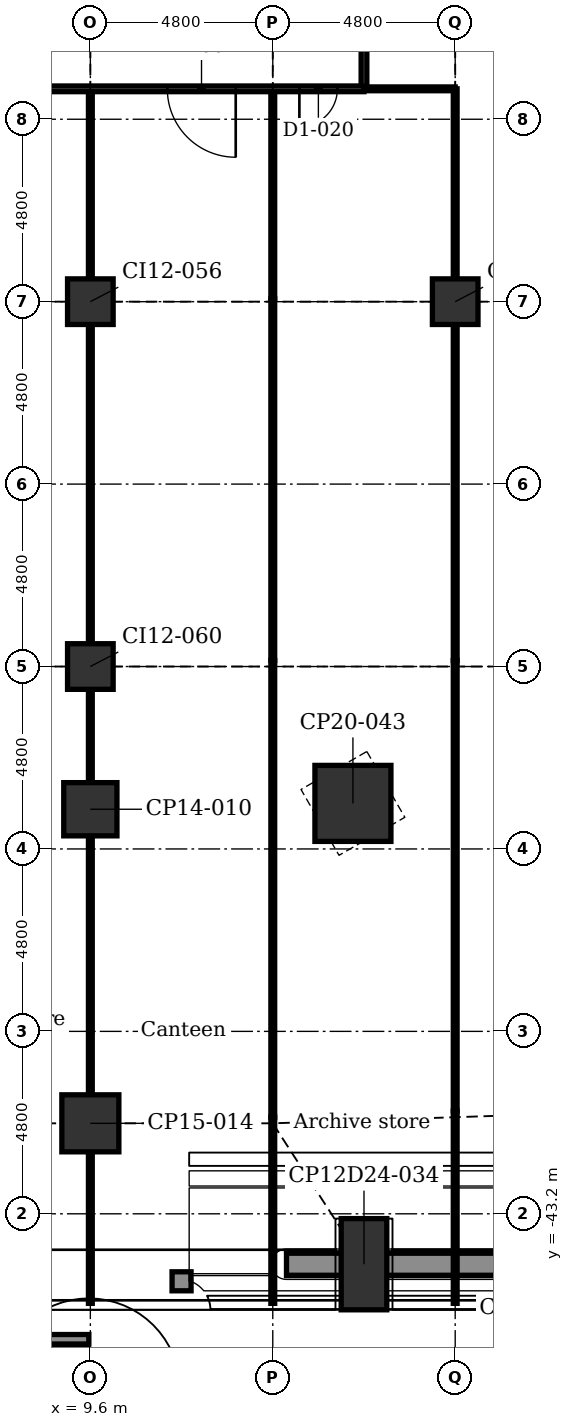
"""IFC4 building model, lengths in metres.
Left out: names, types, materials, properties, quantities, classifications, styles, units other than length and angle.
Written with IfcOpenShell. Run it as: python <this file> out.ifc"""

import sys

from ifc_helpers import new_model, si_unit, direction, frame, frame_2d, origin, origin_2d, place, context, subcontext, project, spatial, polyline, rectangle, outline, extrude, element, fill, save


model = new_model("IFC4")
c1 = context("Model", 3, precision=1e-05, world=origin(), true_north=direction((0.0, 1.0)))
c2 = subcontext(c1, "Body", "Model", "MODEL_VIEW")
j1 = project(units=[si_unit("LENGTHUNIT", "METRE"), si_unit("PLANEANGLEUNIT", "RADIAN")], contexts=[c1])
p1 = place(None, origin())
s1 = spatial("IfcSite", under=j1, at=p1, CompositionType="ELEMENT")
p2 = place(p1, origin())
s2 = spatial("IfcBuilding", under=s1, at=p2, CompositionType="ELEMENT")
p3 = place(p2, frame((0.0, 0.0, 7.0)))
s3 = spatial("IfcBuildingStorey", under=s2, at=p3, CompositionType="ELEMENT", Elevation=7.0)
p4 = place(p3, frame((16.8, -44.526, -0.3), z_axis=(0.0, 0.0, 1.0), x_axis=(1.0, 0.0, 0.0)))
e1 = element("IfcColumn", 1, at=p4, inside=s3, PredefinedType="COLUMN", context=c2, shape_type="SweptSolid", body=[
    extrude(rectangle(XDim=1.2, YDim=2.4, at=origin_2d()), origin(), (0.0, 0.0, 1.0), 5.4),
])
p5 = place(p3, frame((9.6, -40.819, -0.3), z_axis=(0.0, 0.0, 1.0), x_axis=(1.0, 0.0, 0.0)))
e2 = element("IfcColumn", 2, at=p5, inside=s3, PredefinedType="COLUMN", context=c2, shape_type="SweptSolid", body=[
    extrude(rectangle(XDim=1.5, YDim=1.5, at=origin_2d()), origin(), (0.0, 0.0, 1.0), 5.4),
])
p6 = place(p3, frame((16.509, -32.401, -0.3), z_axis=(0.0, 0.0, 1.0), x_axis=(0.866025403784, 0.5, 0.0)))
e3 = element("IfcColumn", 3, at=p6, inside=s3, PredefinedType="COLUMN", context=c2, shape_type="SweptSolid", body=[
    extrude(rectangle(XDim=2.0, YDim=2.0, at=origin_2d()), origin(), (0.0, 0.0, 1.0), 5.4),
])
p7 = place(p3, frame((9.6, -32.555, -0.3), z_axis=(0.0, 0.0, 1.0), x_axis=(1.0, 0.0, 0.0)))
e4 = element("IfcColumn", 4, at=p7, inside=s3, PredefinedType="COLUMN", context=c2, shape_type="SweptSolid", body=[
    extrude(rectangle(XDim=1.4, YDim=1.4, at=origin_2d()), origin(), (0.0, 0.0, 1.0), 5.4),
])
for number, where, z_axis, x_axis in (
    (5, (9.6, -28.8, -0.3), (0.0, 0.0, 1.0), (1.0, 0.0, 0.0)),
    (6, (9.6, -19.2, -0.3), (0.0, 0.0, 1.0), (1.0, 0.0, 0.0)),
    (7, (19.2, -19.2, -0.3), (0.0, 0.0, 1.0), (1.0, 0.0, 0.0)),
):
    element("IfcColumn", number, at=place(p3, frame(where, z_axis=z_axis, x_axis=x_axis)), inside=s3, PredefinedType="COLUMN", context=c2, shape_type="SweptSolid", body=[
        extrude(rectangle(XDim=1.2, YDim=1.2, at=origin_2d()), origin(), (0.0, 0.0, 1.0), 5.4),
    ])
p8 = place(p3, frame((20.761, -44.526, 5.4), z_axis=(0.0, 0.0, 1.0), x_axis=(-1.0, 0.0, 0.0)))
e8 = element("IfcWall", 8, at=p8, inside=s3, PredefinedType="USERDEFINED", context=c2, shape_type="SweptSolid", body=[
    extrude(rectangle(XDim=6.0, YDim=0.6, at=frame_2d((3.0, 0.0))), origin(), (0.0, 0.0, 1.0), 0.7),
])
p9 = place(p3, frame((9.56, -46.501, 0.0), z_axis=(0.0, 0.0, 1.0), x_axis=(-1.0, 0.0, 0.0)))
e9 = element("IfcWall", 9, at=p9, inside=s3, PredefinedType="SOLIDWALL", context=c2, shape_type="SweptSolid", body=[
    extrude(outline(polyline([(0.0, 0.0), (8.4, 0.0), (8.4, 5.5), (0.0, 0.274), (0.0, 0.0)])), frame((0.0, 0.125, 0.0), z_axis=(0.0, -1.0, 0.0), x_axis=(1.0, 0.0, 0.0)), (0.0, 0.0, 1.0), 0.25),
])
p10 = place(p3, frame((12.25, -44.976, 0.0), z_axis=(0.0, 0.0, 1.0), x_axis=(-1.0, 0.0, 0.0)))
e10 = element("IfcWall", 10, at=p10, inside=s3, PredefinedType="SOLIDWALL", context=c2, shape_type="SweptSolid", body=[
    extrude(rectangle(XDim=0.5, YDim=0.5, at=frame_2d((0.25, 0.0))), origin(), (0.0, 0.0, 1.0), 4.8),
])
p11 = place(p3, frame((19.2, -40.498, 0.0), z_axis=(0.0, 0.0, 1.0), x_axis=(0.0, 1.0, 0.0)))
e11 = element("IfcWall", 11, at=p11, inside=s3, PredefinedType="PARTITIONING", context=c2, shape_type="SweptSolid", body=[
    extrude(rectangle(XDim=11.858, YDim=0.1, at=frame_2d((5.929, 0.0))), origin(), (0.0, 0.0, 1.0), 4.567),
])
p12 = place(p3, frame((19.2, -45.556, 0.0), z_axis=(0.0, 0.0, 1.0), x_axis=(0.0, 1.0, 0.0)))
e12 = element("IfcWall", 12, at=p12, inside=s3, PredefinedType="PARTITIONING", context=c2, shape_type="SweptSolid", body=[
    extrude(rectangle(XDim=5.058, YDim=0.1, at=frame_2d((2.529, 0.0))), origin(), (0.0, 0.0, 1.0), 5.1),
])
p13 = place(p3, frame((19.2, -28.64, 0.0), z_axis=(0.0, 0.0, 1.0), x_axis=(0.0, 1.0, 0.0)))
e13 = element("IfcWall", 13, at=p13, inside=s3, PredefinedType="PARTITIONING", context=c2, shape_type="SweptSolid", body=[
    extrude(rectangle(XDim=8.88, YDim=0.1, at=frame_2d((4.44, 0.0))), origin(), (0.0, 0.0, 1.0), 4.693),
])
p14 = place(p3, frame((19.2, -19.76, 0.0), z_axis=(0.0, 0.0, 1.0), x_axis=(0.0, 1.0, 0.0)))
e14 = element("IfcWall", 14, at=p14, inside=s3, PredefinedType="PARTITIONING", context=c2, shape_type="SweptSolid", body=[
    extrude(rectangle(XDim=1.12, YDim=0.1, at=frame_2d((0.56, 0.0))), origin(), (0.0, 0.0, 1.0), 5.1),
])
p15 = place(p3, frame((19.2, -18.64, 0.0), z_axis=(0.0, 0.0, 1.0), x_axis=(0.0, 1.0, 0.0)))
e15 = element("IfcWall", 15, at=p15, inside=s3, PredefinedType="PARTITIONING", context=c2, shape_type="SweptSolid", body=[
    extrude(rectangle(XDim=5.04, YDim=0.1, at=frame_2d((2.52, 0.0))), origin(), (0.0, 0.0, 1.0), 4.693),
])
p16 = place(p3, frame((16.8, -13.6, 0.0), z_axis=(0.0, 0.0, 1.0), x_axis=(0.0, 1.0, 0.0)))
e16 = element("IfcWall", 16, at=p16, inside=s3, PredefinedType="PARTITIONING", context=c2, shape_type="SweptSolid", body=[
    extrude(rectangle(XDim=9.65, YDim=0.15, at=frame_2d((4.825, 0.0))), origin(), (0.0, 0.0, 1.0), 5.1),
])
p17 = place(p16, frame((1.3, 0.0, 0.0)))
e17 = element("IfcOpeningElement", 17, at=p17, cuts=e16, PredefinedType="OPENING", context=c2, shape_type="SweptSolid", body=[
    extrude(rectangle(XDim=1.0, YDim=2.1, at=frame_2d((0.5, 1.05))), frame((0.0, 0.085, 0.0), z_axis=(0.0, -1.0, 0.0), x_axis=(1.0, 0.0, 0.0)), (0.0, 0.0, 1.0), 0.17),
])
p18 = place(p16, frame((7.7, 0.0, 0.0)))
e18 = element("IfcOpeningElement", 18, at=p18, cuts=e16, PredefinedType="OPENING", context=c2, shape_type="SweptSolid", body=[
    extrude(rectangle(XDim=1.0, YDim=2.1, at=frame_2d((0.5, 1.05))), frame((0.0, 0.085, 0.0), z_axis=(0.0, -1.0, 0.0), x_axis=(1.0, 0.0, 0.0)), (0.0, 0.0, 1.0), 0.17),
])
p19 = place(p3, frame((14.4, -40.659, 0.0), z_axis=(0.0, 0.0, 1.0), x_axis=(0.0, 1.0, 0.0)))
e19 = element("IfcWall", 19, at=p19, inside=s3, PredefinedType="PARTITIONING", context=c2, shape_type="SweptSolid", body=[
    extrude(rectangle(XDim=12.019, YDim=0.1, at=frame_2d((6.01, 0.0))), origin(), (0.0, 0.0, 1.0), 4.567),
])
p20 = place(p3, frame((14.4, -45.556, 0.0), z_axis=(0.0, 0.0, 1.0), x_axis=(0.0, 1.0, 0.0)))
e20 = element("IfcWall", 20, at=p20, inside=s3, PredefinedType="PARTITIONING", context=c2, shape_type="SweptSolid", body=[
    extrude(rectangle(XDim=4.897, YDim=0.1, at=frame_2d((2.448, 0.0))), origin(), (0.0, 0.0, 1.0), 5.1),
])
p21 = place(p3, frame((14.4, -28.64, 0.0), z_axis=(0.0, 0.0, 1.0), x_axis=(0.0, 1.0, 0.0)))
e21 = element("IfcWall", 21, at=p21, inside=s3, PredefinedType="PARTITIONING", context=c2, shape_type="SweptSolid", body=[
    extrude(rectangle(XDim=9.514, YDim=0.1, at=frame_2d((4.757, 0.0))), origin(), (0.0, 0.0, 1.0), 4.643),
])
p22 = place(p3, frame((14.4, -19.126, 0.0), z_axis=(0.0, 0.0, 1.0), x_axis=(0.0, 1.0, 0.0)))
e22 = element("IfcWall", 22, at=p22, inside=s3, PredefinedType="PARTITIONING", context=c2, shape_type="SweptSolid", body=[
    extrude(rectangle(XDim=5.526, YDim=0.1, at=frame_2d((2.763, 0.0))), origin(), (0.0, 0.0, 1.0), 4.693),
])
p23 = place(p3, frame((9.6, -28.24, 0.0), z_axis=(0.0, 0.0, 1.0), x_axis=(0.0, 1.0, 0.0)))
e23 = element("IfcWall", 23, at=p23, inside=s3, PredefinedType="PARTITIONING", context=c2, shape_type="SweptSolid", body=[
    extrude(rectangle(XDim=8.48, YDim=0.1, at=frame_2d((4.24, 0.0))), origin(), (0.0, 0.0, 1.0), 4.693),
])
p24 = place(p3, frame((9.6, -45.556, 0.0), z_axis=(0.0, 0.0, 1.0), x_axis=(0.0, 1.0, 0.0)))
e24 = element("IfcWall", 24, at=p24, inside=s3, PredefinedType="PARTITIONING", context=c2, shape_type="SweptSolid", body=[
    extrude(rectangle(XDim=5.447, YDim=0.1, at=frame_2d((2.724, 0.0))), origin(), (0.0, 0.0, 1.0), 5.1),
])
p25 = place(p3, frame((9.6, -40.109, 0.0), z_axis=(0.0, 0.0, 1.0), x_axis=(0.0, 1.0, 0.0)))
e25 = element("IfcWall", 25, at=p25, inside=s3, PredefinedType="PARTITIONING", context=c2, shape_type="SweptSolid", body=[
    extrude(rectangle(XDim=6.894, YDim=0.1, at=frame_2d((3.447, 0.0))), origin(), (0.0, 0.0, 1.0), 4.79),
])
p26 = place(p3, frame((9.6, -33.215, 0.0), z_axis=(0.0, 0.0, 1.0), x_axis=(0.0, 1.0, 0.0)))
e26 = element("IfcWall", 26, at=p26, inside=s3, PredefinedType="PARTITIONING", context=c2, shape_type="SweptSolid", body=[
    extrude(rectangle(XDim=1.32, YDim=0.1, at=frame_2d((0.66, 0.0))), origin(), (0.0, 0.0, 1.0), 5.1),
])
p27 = place(p3, frame((9.6, -31.896, 0.0), z_axis=(0.0, 0.0, 1.0), x_axis=(0.0, 1.0, 0.0)))
e27 = element("IfcWall", 27, at=p27, inside=s3, PredefinedType="PARTITIONING", context=c2, shape_type="SweptSolid", body=[
    extrude(rectangle(XDim=2.535, YDim=0.1, at=frame_2d((1.268, 0.0))), origin(), (0.0, 0.0, 1.0), 4.79),
])
for number, where, z_axis, x_axis in (
    (28, (9.6, -29.36, 0.0), (0.0, 0.0, 1.0), (0.0, 1.0, 0.0)),
    (29, (9.6, -19.76, 0.0), (0.0, 0.0, 1.0), (0.0, 1.0, 0.0)),
):
    element("IfcWall", number, at=place(p3, frame(where, z_axis=z_axis, x_axis=x_axis)), inside=s3, PredefinedType="PARTITIONING", context=c2, shape_type="SweptSolid", body=[
        extrude(rectangle(XDim=1.12, YDim=0.1, at=frame_2d((0.56, 0.0))), origin(), (0.0, 0.0, 1.0), 5.1),
    ])
p28 = place(p3, frame((9.6, -18.64, 0.0), z_axis=(0.0, 0.0, 1.0), x_axis=(0.0, 1.0, 0.0)))
e30 = element("IfcWall", 30, at=p28, inside=s3, PredefinedType="PARTITIONING", context=c2, shape_type="SweptSolid", body=[
    extrude(rectangle(XDim=5.04, YDim=0.1, at=frame_2d((2.52, 0.0))), origin(), (0.0, 0.0, 1.0), 4.693),
])
p29 = place(p3, frame((16.8, -13.6, 0.0), z_axis=(0.0, 0.0, 1.0), x_axis=(1.0, 0.0, 0.0)))
e31 = element("IfcWall", 31, at=p29, inside=s3, PredefinedType="PARTITIONING", context=c2, shape_type="SweptSolid", body=[
    extrude(rectangle(XDim=2.4, YDim=0.1, at=frame_2d((1.2, 0.0))), origin(), (0.0, 0.0, 1.0), 5.1),
])
p30 = place(p3, frame((-16.8, -13.6, 0.0), z_axis=(0.0, 0.0, 1.0), x_axis=(1.0, 0.0, 0.0)))
e32 = element("IfcWall", 32, at=p30, inside=s3, PredefinedType="PARTITIONING", context=c2, shape_type="SweptSolid", body=[
    extrude(rectangle(XDim=33.6, YDim=0.15, at=frame_2d((16.8, 0.0))), origin(), (0.0, 0.0, 1.0), 5.1),
])
p31 = place(p30, frame((0.7, 0.0, 0.0)))
e33 = element("IfcOpeningElement", 33, at=p31, cuts=e32, PredefinedType="OPENING", context=c2, shape_type="SweptSolid", body=[
    extrude(rectangle(XDim=1.0, YDim=2.1, at=frame_2d((0.5, 1.05))), frame((0.0, 0.085, 0.0), z_axis=(0.0, -1.0, 0.0), x_axis=(1.0, 0.0, 0.0)), (0.0, 0.0, 1.0), 0.17),
])
p32 = place(p30, frame((4.3, 0.0, 0.0)))
e34 = element("IfcOpeningElement", 34, at=p32, cuts=e32, PredefinedType="OPENING", context=c2, shape_type="SweptSolid", body=[
    extrude(rectangle(XDim=1.0, YDim=2.1, at=frame_2d((0.5, 1.05))), frame((0.0, 0.085, 0.0), z_axis=(0.0, -1.0, 0.0), x_axis=(1.0, 0.0, 0.0)), (0.0, 0.0, 1.0), 0.17),
])
p33 = place(p30, frame((13.9, 0.0, 0.0)))
e35 = element("IfcOpeningElement", 35, at=p33, cuts=e32, PredefinedType="OPENING", context=c2, shape_type="SweptSolid", body=[
    extrude(rectangle(XDim=1.0, YDim=2.1, at=frame_2d((0.5, 1.05))), frame((0.0, 0.085, 0.0), z_axis=(0.0, -1.0, 0.0), x_axis=(1.0, 0.0, 0.0)), (0.0, 0.0, 1.0), 0.17),
])
p34 = place(p30, frame((23.5, 0.0, 0.0)))
e36 = element("IfcOpeningElement", 36, at=p34, cuts=e32, PredefinedType="OPENING", context=c2, shape_type="SweptSolid", body=[
    extrude(rectangle(XDim=1.0, YDim=2.1, at=frame_2d((0.5, 1.05))), frame((0.0, 0.085, 0.0), z_axis=(0.0, -1.0, 0.0), x_axis=(1.0, 0.0, 0.0)), (0.0, 0.0, 1.0), 0.17),
])
p35 = place(p30, frame((28.425, 0.0, 0.0)))
e37 = element("IfcOpeningElement", 37, at=p35, cuts=e32, PredefinedType="OPENING", context=c2, shape_type="SweptSolid", body=[
    extrude(rectangle(XDim=1.8, YDim=2.1, at=frame_2d((0.9, 1.05))), frame((0.0, 0.085, 0.0), z_axis=(0.0, -1.0, 0.0), x_axis=(1.0, 0.0, 0.0)), (0.0, 0.0, 1.0), 0.17),
])
p36 = place(p30, frame((31.9, 0.0, 0.0)))
e38 = element("IfcOpeningElement", 38, at=p36, cuts=e32, PredefinedType="OPENING", context=c2, shape_type="SweptSolid", body=[
    extrude(rectangle(XDim=1.0, YDim=2.1, at=frame_2d((0.5, 1.05))), frame((0.0, 0.085, 0.0), z_axis=(0.0, -1.0, 0.0), x_axis=(1.0, 0.0, 0.0)), (0.0, 0.0, 1.0), 0.17),
])
p37 = place(p35, frame((1.8, 0.0, 0.0), z_axis=(0.0, 0.0, 1.0), x_axis=(-1.0, 0.0, 0.0)))
e39 = element("IfcDoor", 39, at=p37, inside=s3, OperationType="SINGLE_SWING_RIGHT", PredefinedType="DOOR", context=c2, shape_type="SweptSolid", body=[
    extrude(rectangle(XDim=1.8, YDim=2.1, at=frame_2d((0.9, 1.05))), frame((0.0, 0.025, 0.0), z_axis=(0.0, -1.0, 0.0), x_axis=(1.0, 0.0, 0.0)), (0.0, 0.0, 1.0), 0.05),
])
fill(e37, e39)
p38 = place(p36, frame((1.0, 0.0, 0.0), z_axis=(0.0, 0.0, 1.0), x_axis=(-1.0, 0.0, 0.0)))
e40 = element("IfcDoor", 40, at=p38, inside=s3, OperationType="SINGLE_SWING_LEFT", PredefinedType="DOOR", context=c2, shape_type="SweptSolid", body=[
    extrude(rectangle(XDim=1.0, YDim=2.1, at=frame_2d((0.5, 1.05))), frame((0.0, 0.025, 0.0), z_axis=(0.0, -1.0, 0.0), x_axis=(1.0, 0.0, 0.0)), (0.0, 0.0, 1.0), 0.05),
])
fill(e38, e40)
save(model, sys.argv[1])
